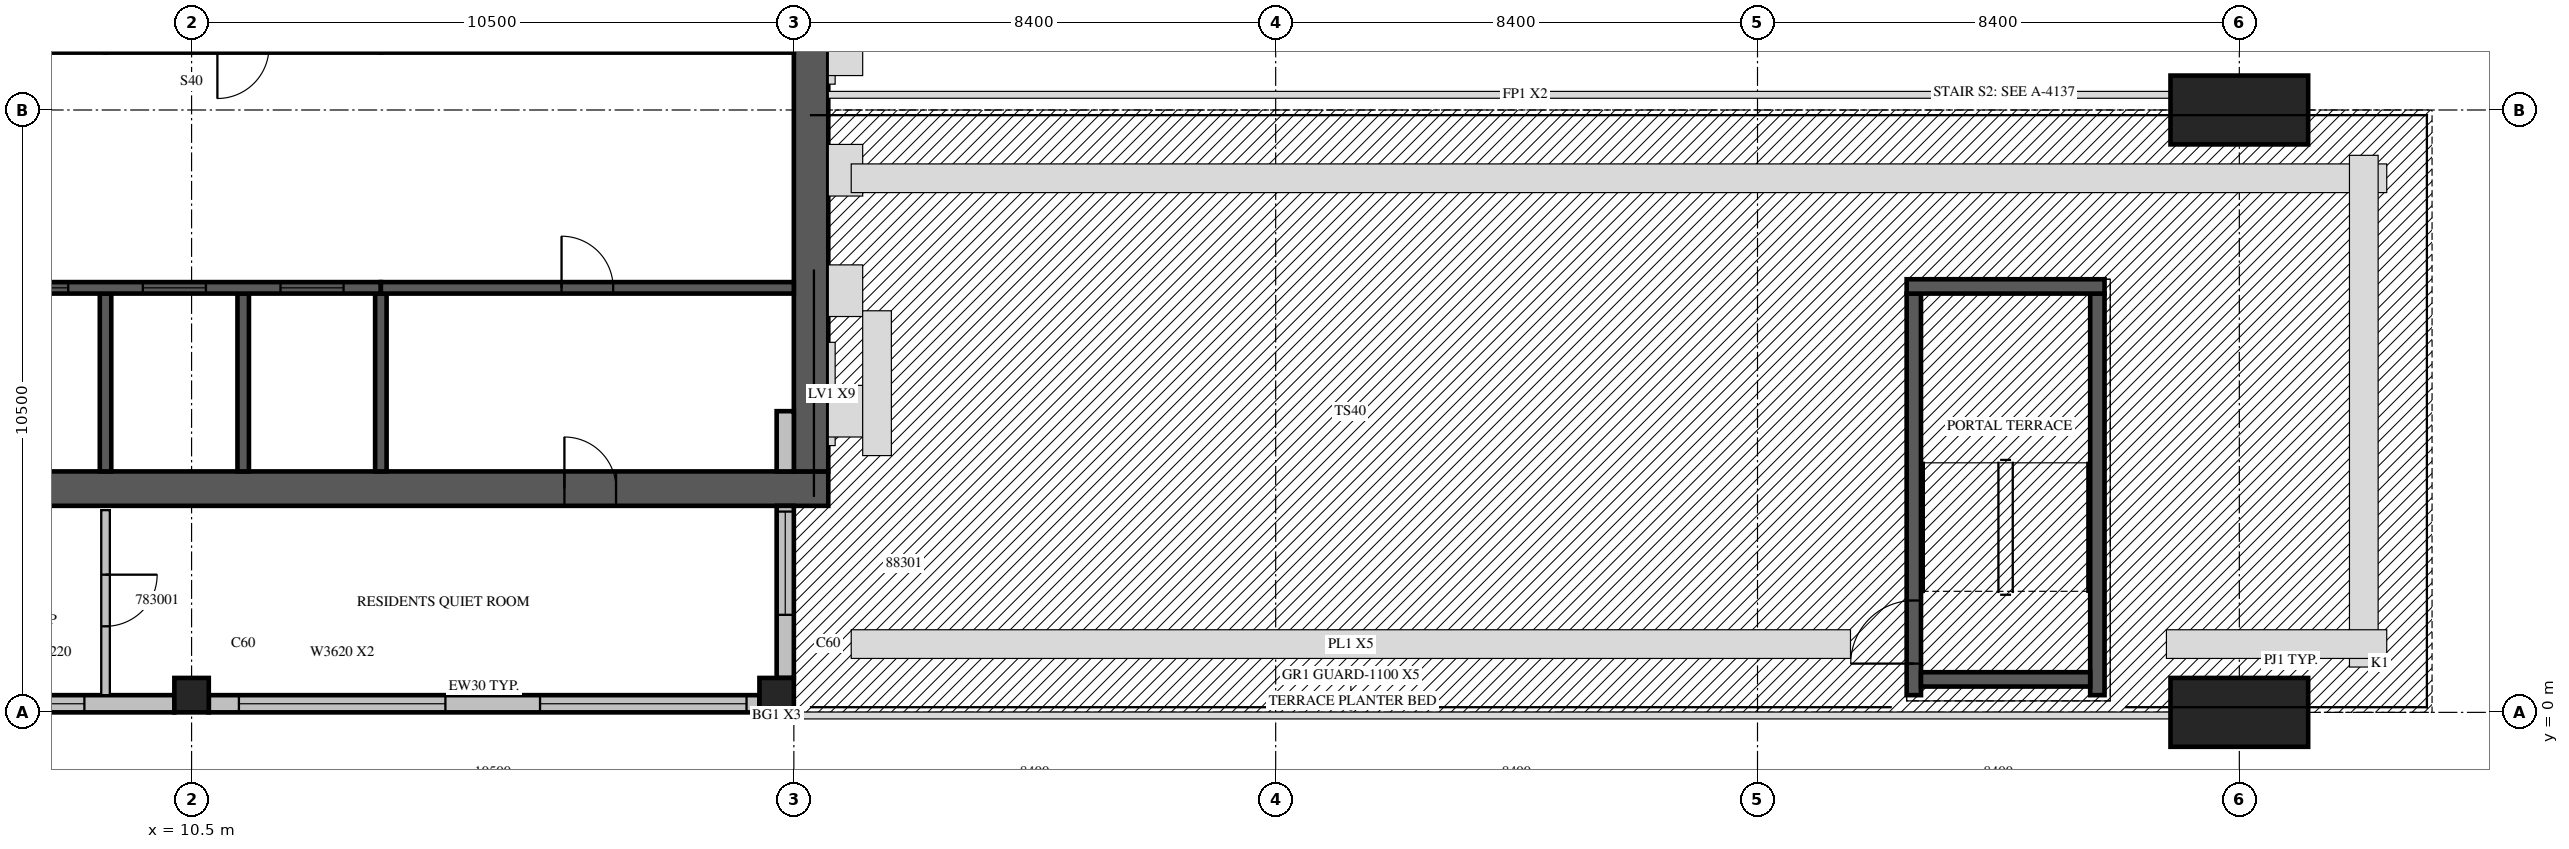
"""IFC4 building model, lengths in metres.
Left out: names, types, materials, properties, quantities, classifications, styles, units other than length and angle.
Written with IfcOpenShell. Run it as: python <this file> out.ifc"""

import sys

from ifc_helpers import new_model, si_unit, direction, frame, frame_2d, origin, origin_2d, place, context, subcontext, project, spatial, rectangle, extrude, source, transform, mapped, element, fill, save


model = new_model("IFC4")
c1 = context("Model", 3, precision=1e-05, world=origin(), true_north=direction((0.0, 1.0)))
c2 = subcontext(c1, "Body", "Model", "MODEL_VIEW")
j1 = project(units=[si_unit("LENGTHUNIT", "METRE"), si_unit("PLANEANGLEUNIT", "RADIAN")], contexts=[c1])
p1 = place(None, origin())
s1 = spatial("IfcSite", under=j1, at=p1, CompositionType="ELEMENT")
p2 = place(p1, origin())
s2 = spatial("IfcBuilding", under=s1, at=p2, CompositionType="ELEMENT")
p3 = place(p2, frame((0.0, 0.0, 351.0)))
s3 = spatial("IfcBuildingStorey", under=s2, at=p3, CompositionType="ELEMENT", Elevation=351.0)
m1 = source(origin(), c2, "Body", "SweptSolid", [
    extrude(rectangle(XDim=0.6, YDim=0.6, at=origin_2d()), origin(), (0.0, 0.0, 1.0), 3.5),
])
for number, where, z_axis, x_axis in (
    (1, (10.5, 0.3, 0.0), (0.0, 0.0, 1.0), (1.0, 0.0, 0.0)),
    (2, (20.7, 0.3, 0.0), (0.0, 0.0, 1.0), (1.0, 0.0, 0.0)),
):
    element("IfcColumn", number, at=place(p3, frame(where, z_axis=z_axis, x_axis=x_axis)), inside=s3, PredefinedType="COLUMN", context=c2, shape_type="MappedRepresentation", body=[
        mapped(m1, transform((0.0, 0.0, 0.0), scale=1.0)),
    ])
m2 = source(origin(), c2, "Body", "SweptSolid", [
    extrude(rectangle(XDim=2.4, YDim=1.2, at=origin_2d()), origin(), (0.0, 0.0, 1.0), 3.5),
])
for number, where, z_axis, x_axis in (
    (3, (46.2, 0.0, 0.0), (0.0, 0.0, 1.0), (1.0, 0.0, 0.0)),
    (4, (46.2, 10.5, 0.0), (0.0, 0.0, 1.0), (1.0, 0.0, 0.0)),
):
    element("IfcColumn", number, at=place(p3, frame(where, z_axis=z_axis, x_axis=x_axis)), inside=s3, PredefinedType="PILASTER", context=c2, shape_type="MappedRepresentation", body=[
        mapped(m2, transform((0.0, 0.0, 0.0), scale=1.0)),
    ])
m3 = source(origin(), c2, "Body", "SweptSolid", [
    extrude(rectangle(XDim=17.4, YDim=0.6, at=frame_2d((8.7, 0.0))), origin(), (0.0, 0.0, 1.0), 3.5),
])
p4 = place(p3, frame((4.2, 3.9, 0.0), z_axis=(0.0, 0.0, 1.0), x_axis=(1.0, 0.0, 0.0)))
e5 = element("IfcWall", 5, at=p4, inside=s3, PredefinedType="SHEAR", context=c2, shape_type="MappedRepresentation", body=[
    mapped(m3, transform((0.0, 0.0, 0.0), scale=1.0)),
])
m4 = source(origin(), c2, "Body", "SweptSolid", [
    extrude(rectangle(XDim=0.9, YDim=2.1, at=frame_2d((0.45, 1.05))), frame((0.0, 0.31, 0.0), z_axis=(0.0, -1.0, 0.0), x_axis=(1.0, 0.0, 0.0)), (0.0, 0.0, 1.0), 0.62),
])
p5 = place(p4, frame((12.8, 0.0, 0.0)))
e6 = element("IfcOpeningElement", 6, at=p5, cuts=e5, PredefinedType="OPENING", context=c2, shape_type="MappedRepresentation", body=[
    mapped(m4, transform((0.0, 0.0, 0.0), scale=1.0)),
])
m5 = source(origin(), c2, "Body", "SweptSolid", [
    extrude(rectangle(XDim=16.8, YDim=0.6, at=frame_2d((8.4, 0.0))), origin(), (0.0, 0.0, 1.0), 3.5),
])
p6 = place(p3, frame((21.3, 4.2, 0.0), z_axis=(0.0, 0.0, 1.0), x_axis=(0.0, 1.0, 0.0)))
e7 = element("IfcWall", 7, at=p6, inside=s3, PredefinedType="SHEAR", context=c2, shape_type="MappedRepresentation", body=[
    mapped(m5, transform((0.0, 0.0, 0.0), scale=1.0)),
])
m6 = source(origin(), c2, "Body", "SweptSolid", [
    extrude(rectangle(XDim=1.2, YDim=2.4, at=frame_2d((0.6, 1.2))), frame((0.0, 0.31, 0.0), z_axis=(0.0, -1.0, 0.0), x_axis=(1.0, 0.0, 0.0)), (0.0, 0.0, 1.0), 0.62),
])
p7 = place(p6, frame((12.0, 0.0, 0.6)))
e8 = element("IfcOpeningElement", 8, at=p7, cuts=e7, PredefinedType="OPENING", context=c2, shape_type="MappedRepresentation", body=[
    mapped(m6, transform((0.0, 0.0, 0.0), scale=1.0)),
])
m7 = source(origin(), c2, "Body", "SweptSolid", [
    extrude(rectangle(XDim=6.0, YDim=0.3, at=frame_2d((3.0, 0.0))), origin(), (0.0, 0.0, 1.0), 3.1),
])
p8 = place(p3, frame((4.2, 0.15, 0.0), z_axis=(0.0, 0.0, 1.0), x_axis=(1.0, 0.0, 0.0)))
e9 = element("IfcWall", 9, at=p8, inside=s3, PredefinedType="STANDARD", context=c2, shape_type="MappedRepresentation", body=[
    mapped(m7, transform((0.0, 0.0, 0.0), scale=1.0)),
])
m8 = source(origin(), c2, "Body", "SweptSolid", [
    extrude(rectangle(XDim=1.8, YDim=2.0, at=frame_2d((0.9, 1.0))), frame((0.0, 0.16, 0.0), z_axis=(0.0, -1.0, 0.0), x_axis=(1.0, 0.0, 0.0)), (0.0, 0.0, 1.0), 0.32),
])
p9 = place(p8, frame((0.675, 0.0, 0.6)))
e10 = element("IfcOpeningElement", 10, at=p9, cuts=e9, PredefinedType="OPENING", context=c2, shape_type="MappedRepresentation", body=[
    mapped(m8, transform((0.0, 0.0, 0.0), scale=1.0)),
])
m9 = source(origin(), c2, "Body", "SweptSolid", [
    extrude(rectangle(XDim=1.2, YDim=2.0, at=frame_2d((0.6, 1.0))), frame((0.0, 0.16, 0.0), z_axis=(0.0, -1.0, 0.0), x_axis=(1.0, 0.0, 0.0)), (0.0, 0.0, 1.0), 0.32),
])
p10 = place(p8, frame((3.231, 0.0, 0.6)))
e11 = element("IfcOpeningElement", 11, at=p10, cuts=e9, PredefinedType="OPENING", context=c2, shape_type="MappedRepresentation", body=[
    mapped(m9, transform((0.0, 0.0, 0.0), scale=1.0)),
])
m10 = source(origin(), c2, "Body", "SweptSolid", [
    extrude(rectangle(XDim=9.6, YDim=0.3, at=frame_2d((4.8, 0.0))), origin(), (0.0, 0.0, 1.0), 3.1),
])
p11 = place(p3, frame((10.8, 0.15, 0.0), z_axis=(0.0, 0.0, 1.0), x_axis=(1.0, 0.0, 0.0)))
e12 = element("IfcWall", 12, at=p11, inside=s3, PredefinedType="STANDARD", context=c2, shape_type="MappedRepresentation", body=[
    mapped(m10, transform((0.0, 0.0, 0.0), scale=1.0)),
])
m11 = source(origin(), c2, "Body", "SweptSolid", [
    extrude(rectangle(XDim=3.6, YDim=2.0, at=frame_2d((1.8, 1.0))), frame((0.0, 0.16, 0.0), z_axis=(0.0, -1.0, 0.0), x_axis=(1.0, 0.0, 0.0)), (0.0, 0.0, 1.0), 0.32),
])
p12 = place(p11, frame((0.525, 0.0, 0.6)))
e13 = element("IfcOpeningElement", 13, at=p12, cuts=e12, PredefinedType="OPENING", context=c2, shape_type="MappedRepresentation", body=[
    mapped(m11, transform((0.0, 0.0, 0.0), scale=1.0)),
])
p13 = place(p11, frame((5.775, 0.0, 0.6)))
e14 = element("IfcOpeningElement", 14, at=p13, cuts=e12, PredefinedType="OPENING", context=c2, shape_type="MappedRepresentation", body=[
    mapped(m11, transform((0.0, 0.0, 0.0), scale=1.0)),
])
m12 = source(origin(), c2, "Body", "SweptSolid", [
    extrude(rectangle(XDim=3.0, YDim=0.3, at=frame_2d((1.5, 0.0))), origin(), (0.0, 0.0, 1.0), 3.1),
])
p14 = place(p3, frame((20.85, 0.6, 0.0), z_axis=(0.0, 0.0, 1.0), x_axis=(0.0, 1.0, 0.0)))
e15 = element("IfcWall", 15, at=p14, inside=s3, PredefinedType="STANDARD", context=c2, shape_type="MappedRepresentation", body=[
    mapped(m12, transform((0.0, 0.0, 0.0), scale=1.0)),
])
m13 = source(origin(), c2, "Body", "SweptSolid", [
    extrude(rectangle(XDim=1.8, YDim=2.4, at=frame_2d((0.9, 1.2))), frame((0.0, 0.16, 0.0), z_axis=(0.0, -1.0, 0.0), x_axis=(1.0, 0.0, 0.0)), (0.0, 0.0, 1.0), 0.32),
])
p15 = place(p14, frame((1.1, 0.0, 0.0)))
e16 = element("IfcOpeningElement", 16, at=p15, cuts=e15, PredefinedType="OPENING", context=c2, shape_type="MappedRepresentation", body=[
    mapped(m13, transform((0.0, 0.0, 0.0), scale=1.0)),
])
m14 = source(origin(), c2, "Body", "SweptSolid", [
    extrude(rectangle(XDim=1.05, YDim=0.3, at=frame_2d((0.525, 0.0))), origin(), (0.0, 0.0, 1.0), 3.1),
])
p16 = place(p3, frame((20.85, 4.2, 0.0), z_axis=(0.0, 0.0, 1.0), x_axis=(0.0, 1.0, 0.0)))
e17 = element("IfcWall", 17, at=p16, inside=s3, PredefinedType="STANDARD", context=c2, shape_type="MappedRepresentation", body=[
    mapped(m14, transform((0.0, 0.0, 0.0), scale=1.0)),
])
m15 = source(origin(), c2, "Body", "SweptSolid", [
    extrude(rectangle(XDim=3.1, YDim=0.2, at=frame_2d((1.55, 0.0))), origin(), (0.0, 0.0, 1.0), 3.5),
])
for number, where, z_axis, x_axis in (
    (18, (9.0, 4.2, 0.0), (0.0, 0.0, 1.0), (0.0, 1.0, 0.0)),
    (19, (11.4, 4.2, 0.0), (0.0, 0.0, 1.0), (0.0, 1.0, 0.0)),
):
    element("IfcWall", number, at=place(p3, frame(where, z_axis=z_axis, x_axis=x_axis)), inside=s3, PredefinedType="SOLIDWALL", context=c2, shape_type="MappedRepresentation", body=[
        mapped(m15, transform((0.0, 0.0, 0.0), scale=1.0)),
    ])
m16 = source(origin(), c2, "Body", "SweptSolid", [
    extrude(rectangle(XDim=3.1, YDim=0.2, at=frame_2d((1.55, 0.0))), origin(), (0.0, 0.0, 1.0), 3.1),
])
p17 = place(p3, frame((13.8, 4.2, 0.0), z_axis=(0.0, 0.0, 1.0), x_axis=(0.0, 1.0, 0.0)))
e20 = element("IfcWall", 20, at=p17, inside=s3, PredefinedType="SOLIDWALL", context=c2, shape_type="MappedRepresentation", body=[
    mapped(m16, transform((0.0, 0.0, 0.0), scale=1.0)),
])
m17 = source(origin(), c2, "Body", "SweptSolid", [
    extrude(rectangle(XDim=9.6, YDim=0.2, at=frame_2d((4.8, 0.0))), origin(), (0.0, 0.0, 1.0), 3.5),
])
p18 = place(p3, frame((4.2, 7.4, 0.0), z_axis=(0.0, 0.0, 1.0), x_axis=(1.0, 0.0, 0.0)))
e21 = element("IfcWall", 21, at=p18, inside=s3, PredefinedType="SOLIDWALL", context=c2, shape_type="MappedRepresentation", body=[
    mapped(m17, transform((0.0, 0.0, 0.0), scale=1.0)),
])
m18 = source(origin(), c2, "Body", "SweptSolid", [
    extrude(rectangle(XDim=1.1, YDim=2.1, at=frame_2d((0.55, 1.05))), frame((0.0, 0.11, 0.0), z_axis=(0.0, -1.0, 0.0), x_axis=(1.0, 0.0, 0.0)), (0.0, 0.0, 1.0), 0.22),
])
p19 = place(p18, frame((0.65, 0.0, 0.0)))
e22 = element("IfcOpeningElement", 22, at=p19, cuts=e21, PredefinedType="OPENING", context=c2, shape_type="MappedRepresentation", body=[
    mapped(m18, transform((0.0, 0.0, 0.0), scale=1.0)),
])
p20 = place(p18, frame((3.05, 0.0, 0.0)))
e23 = element("IfcOpeningElement", 23, at=p20, cuts=e21, PredefinedType="OPENING", context=c2, shape_type="MappedRepresentation", body=[
    mapped(m18, transform((0.0, 0.0, 0.0), scale=1.0)),
])
p21 = place(p18, frame((5.45, 0.0, 0.0)))
e24 = element("IfcOpeningElement", 24, at=p21, cuts=e21, PredefinedType="OPENING", context=c2, shape_type="MappedRepresentation", body=[
    mapped(m18, transform((0.0, 0.0, 0.0), scale=1.0)),
])
p22 = place(p18, frame((7.85, 0.0, 0.0)))
e25 = element("IfcOpeningElement", 25, at=p22, cuts=e21, PredefinedType="OPENING", context=c2, shape_type="MappedRepresentation", body=[
    mapped(m18, transform((0.0, 0.0, 0.0), scale=1.0)),
])
m19 = source(origin(), c2, "Body", "SweptSolid", [
    extrude(rectangle(XDim=7.2, YDim=0.2, at=frame_2d((3.6, 0.0))), origin(), (0.0, 0.0, 1.0), 3.1),
])
p23 = place(p3, frame((13.8, 7.4, 0.0), z_axis=(0.0, 0.0, 1.0), x_axis=(1.0, 0.0, 0.0)))
e26 = element("IfcWall", 26, at=p23, inside=s3, PredefinedType="SOLIDWALL", context=c2, shape_type="MappedRepresentation", body=[
    mapped(m19, transform((0.0, 0.0, 0.0), scale=1.0)),
])
m20 = source(origin(), c2, "Body", "SweptSolid", [
    extrude(rectangle(XDim=0.9, YDim=2.1, at=frame_2d((0.45, 1.05))), frame((0.0, 0.11, 0.0), z_axis=(0.0, -1.0, 0.0), x_axis=(1.0, 0.0, 0.0)), (0.0, 0.0, 1.0), 0.22),
])
p24 = place(p23, frame((3.15, 0.0, 0.0)))
e27 = element("IfcOpeningElement", 27, at=p24, cuts=e26, PredefinedType="OPENING", context=c2, shape_type="MappedRepresentation", body=[
    mapped(m20, transform((0.0, 0.0, 0.0), scale=1.0)),
])
m21 = source(origin(), c2, "Body", "SweptSolid", [
    extrude(rectangle(XDim=7.0, YDim=0.25, at=frame_2d((3.5, 0.0))), origin(), (0.0, 0.0, 1.0), 3.1),
])
p25 = place(p3, frame((40.525, 0.3, 0.0), z_axis=(0.0, 0.0, 1.0), x_axis=(0.0, 1.0, 0.0)))
e28 = element("IfcWall", 28, at=p25, inside=s3, PredefinedType="SOLIDWALL", context=c2, shape_type="MappedRepresentation", body=[
    mapped(m21, transform((0.0, 0.0, 0.0), scale=1.0)),
])
m22 = source(origin(), c2, "Body", "SweptSolid", [
    extrude(rectangle(XDim=1.1, YDim=2.1, at=frame_2d((0.55, 1.05))), frame((0.0, 0.135, 0.0), z_axis=(0.0, -1.0, 0.0), x_axis=(1.0, 0.0, 0.0)), (0.0, 0.0, 1.0), 0.27),
])
p26 = place(p25, frame((0.55, 0.0, 0.0)))
e29 = element("IfcOpeningElement", 29, at=p26, cuts=e28, PredefinedType="OPENING", context=c2, shape_type="MappedRepresentation", body=[
    mapped(m22, transform((0.0, 0.0, 0.0), scale=1.0)),
])
p27 = place(p3, frame((43.725, 0.3, 0.0), z_axis=(0.0, 0.0, 1.0), x_axis=(0.0, 1.0, 0.0)))
e30 = element("IfcWall", 30, at=p27, inside=s3, PredefinedType="SOLIDWALL", context=c2, shape_type="MappedRepresentation", body=[
    mapped(m21, transform((0.0, 0.0, 0.0), scale=1.0)),
])
m23 = source(origin(), c2, "Body", "SweptSolid", [
    extrude(rectangle(XDim=3.45, YDim=0.25, at=frame_2d((1.725, 0.0))), origin(), (0.0, 0.0, 1.0), 3.1),
])
p28 = place(p3, frame((40.4, 7.425, 0.0), z_axis=(0.0, 0.0, 1.0), x_axis=(1.0, 0.0, 0.0)))
e31 = element("IfcWall", 31, at=p28, inside=s3, PredefinedType="SOLIDWALL", context=c2, shape_type="MappedRepresentation", body=[
    mapped(m23, transform((0.0, 0.0, 0.0), scale=1.0)),
])
m24 = source(origin(), c2, "Body", "SweptSolid", [
    extrude(rectangle(XDim=2.95, YDim=0.25, at=frame_2d((1.475, 0.0))), origin(), (0.0, 0.0, 1.0), 3.1),
])
p29 = place(p3, frame((40.65, 0.575, 0.0), z_axis=(0.0, 0.0, 1.0), x_axis=(1.0, 0.0, 0.0)))
e32 = element("IfcWall", 32, at=p29, inside=s3, PredefinedType="SOLIDWALL", context=c2, shape_type="MappedRepresentation", body=[
    mapped(m24, transform((0.0, 0.0, 0.0), scale=1.0)),
])
m25 = source(origin(), c2, "Body", "SweptSolid", [
    extrude(rectangle(XDim=3.225, YDim=0.15, at=frame_2d((1.613, 0.0))), origin(), (0.0, 0.0, 1.0), 3.1),
])
p30 = place(p3, frame((9.0, 3.525, 0.0), z_axis=(0.0, 0.0, 1.0), x_axis=(0.0, -1.0, 0.0)))
e33 = element("IfcWall", 33, at=p30, inside=s3, PredefinedType="PARTITIONING", context=c2, shape_type="MappedRepresentation", body=[
    mapped(m25, transform((0.0, 0.0, 0.0), scale=1.0)),
])
m26 = source(origin(), c2, "Body", "SweptSolid", [
    extrude(rectangle(XDim=0.9, YDim=2.1, at=frame_2d((0.45, 1.05))), frame((0.0, 0.085, 0.0), z_axis=(0.0, -1.0, 0.0), x_axis=(1.0, 0.0, 0.0)), (0.0, 0.0, 1.0), 0.17),
])
p31 = place(p30, frame((1.125, 0.0, 0.0)))
e34 = element("IfcOpeningElement", 34, at=p31, cuts=e33, PredefinedType="OPENING", context=c2, shape_type="MappedRepresentation", body=[
    mapped(m26, transform((0.0, 0.0, 0.0), scale=1.0)),
])
m27 = source(origin(), c2, "Body", "SweptSolid", [
    extrude(rectangle(XDim=1.2, YDim=2.0, at=frame_2d((0.6, 1.0))), frame((0.0, 0.03, 0.0), z_axis=(0.0, -1.0, 0.0), x_axis=(1.0, 0.0, 0.0)), (0.0, 0.0, 1.0), 0.06),
])
p32 = place(p10, origin())
e35 = element("IfcWindow", 35, at=p32, inside=s3, PartitioningType="SINGLE_PANEL", PredefinedType="WINDOW", context=c2, shape_type="MappedRepresentation", body=[
    mapped(m27, transform((0.0, 0.0, 0.0), scale=1.0)),
])
fill(e11, e35)
m28 = source(origin(), c2, "Body", "SweptSolid", [
    extrude(rectangle(XDim=3.6, YDim=2.0, at=frame_2d((1.8, 1.0))), frame((0.0, 0.03, 0.0), z_axis=(0.0, -1.0, 0.0), x_axis=(1.0, 0.0, 0.0)), (0.0, 0.0, 1.0), 0.06),
])
p33 = place(p12, origin())
e36 = element("IfcWindow", 36, at=p33, inside=s3, PartitioningType="SINGLE_PANEL", PredefinedType="WINDOW", context=c2, shape_type="MappedRepresentation", body=[
    mapped(m28, transform((0.0, 0.0, 0.0), scale=1.0)),
])
fill(e13, e36)
p34 = place(p13, origin())
e37 = element("IfcWindow", 37, at=p34, inside=s3, PartitioningType="SINGLE_PANEL", PredefinedType="WINDOW", context=c2, shape_type="MappedRepresentation", body=[
    mapped(m28, transform((0.0, 0.0, 0.0), scale=1.0)),
])
fill(e14, e37)
m29 = source(origin(), c2, "Body", "SweptSolid", [
    extrude(rectangle(XDim=1.8, YDim=2.4, at=frame_2d((0.9, 1.2))), frame((0.0, 0.025, 0.0), z_axis=(0.0, -1.0, 0.0), x_axis=(1.0, 0.0, 0.0)), (0.0, 0.0, 1.0), 0.05),
])
p35 = place(p15, origin())
e38 = element("IfcDoor", 38, at=p35, inside=s3, OperationType="SLIDING_TO_LEFT", PredefinedType="DOOR", context=c2, shape_type="MappedRepresentation", body=[
    mapped(m29, transform((0.0, 0.0, 0.0), scale=1.0)),
])
fill(e16, e38)
m30 = source(origin(), c2, "Body", "SweptSolid", [
    extrude(rectangle(XDim=1.1, YDim=2.1, at=frame_2d((0.55, 1.05))), frame((0.0, 0.025, 0.0), z_axis=(0.0, -1.0, 0.0), x_axis=(1.0, 0.0, 0.0)), (0.0, 0.0, 1.0), 0.05),
])
p36 = place(p20, origin())
e39 = element("IfcDoor", 39, at=p36, inside=s3, OperationType="SLIDING_TO_LEFT", PredefinedType="DOOR", context=c2, shape_type="MappedRepresentation", body=[
    mapped(m30, transform((0.0, 0.0, 0.0), scale=1.0)),
])
fill(e23, e39)
p37 = place(p21, origin())
e40 = element("IfcDoor", 40, at=p37, inside=s3, OperationType="SLIDING_TO_LEFT", PredefinedType="DOOR", context=c2, shape_type="MappedRepresentation", body=[
    mapped(m30, transform((0.0, 0.0, 0.0), scale=1.0)),
])
fill(e24, e40)
p38 = place(p22, origin())
e41 = element("IfcDoor", 41, at=p38, inside=s3, OperationType="SLIDING_TO_LEFT", PredefinedType="DOOR", context=c2, shape_type="MappedRepresentation", body=[
    mapped(m30, transform((0.0, 0.0, 0.0), scale=1.0)),
])
fill(e25, e41)
m31 = source(origin(), c2, "Body", "SweptSolid", [
    extrude(rectangle(XDim=0.9, YDim=2.1, at=frame_2d((0.45, 1.05))), frame((0.0, 0.025, 0.0), z_axis=(0.0, -1.0, 0.0), x_axis=(1.0, 0.0, 0.0)), (0.0, 0.0, 1.0), 0.05),
])
p39 = place(p24, origin())
e42 = element("IfcDoor", 42, at=p39, inside=s3, OperationType="SINGLE_SWING_LEFT", PredefinedType="DOOR", context=c2, shape_type="MappedRepresentation", body=[
    mapped(m31, transform((0.0, 0.0, 0.0), scale=1.0)),
])
fill(e27, e42)
p40 = place(p26, origin())
e43 = element("IfcDoor", 43, at=p40, inside=s3, OperationType="SINGLE_SWING_LEFT", PredefinedType="DOOR", context=c2, shape_type="MappedRepresentation", body=[
    mapped(m30, transform((0.0, 0.0, 0.0), scale=1.0)),
])
fill(e29, e43)
p41 = place(p5, origin())
e44 = element("IfcDoor", 44, at=p41, inside=s3, OperationType="SINGLE_SWING_LEFT", PredefinedType="DOOR", context=c2, shape_type="MappedRepresentation", body=[
    mapped(m31, transform((0.0, 0.0, 0.0), scale=1.0)),
])
fill(e6, e44)
p42 = place(p31, origin())
e45 = element("IfcDoor", 45, at=p42, inside=s3, OperationType="SINGLE_SWING_LEFT", PredefinedType="DOOR", context=c2, shape_type="MappedRepresentation", body=[
    mapped(m31, transform((0.0, 0.0, 0.0), scale=1.0)),
])
fill(e34, e45)
save(model, sys.argv[1])
